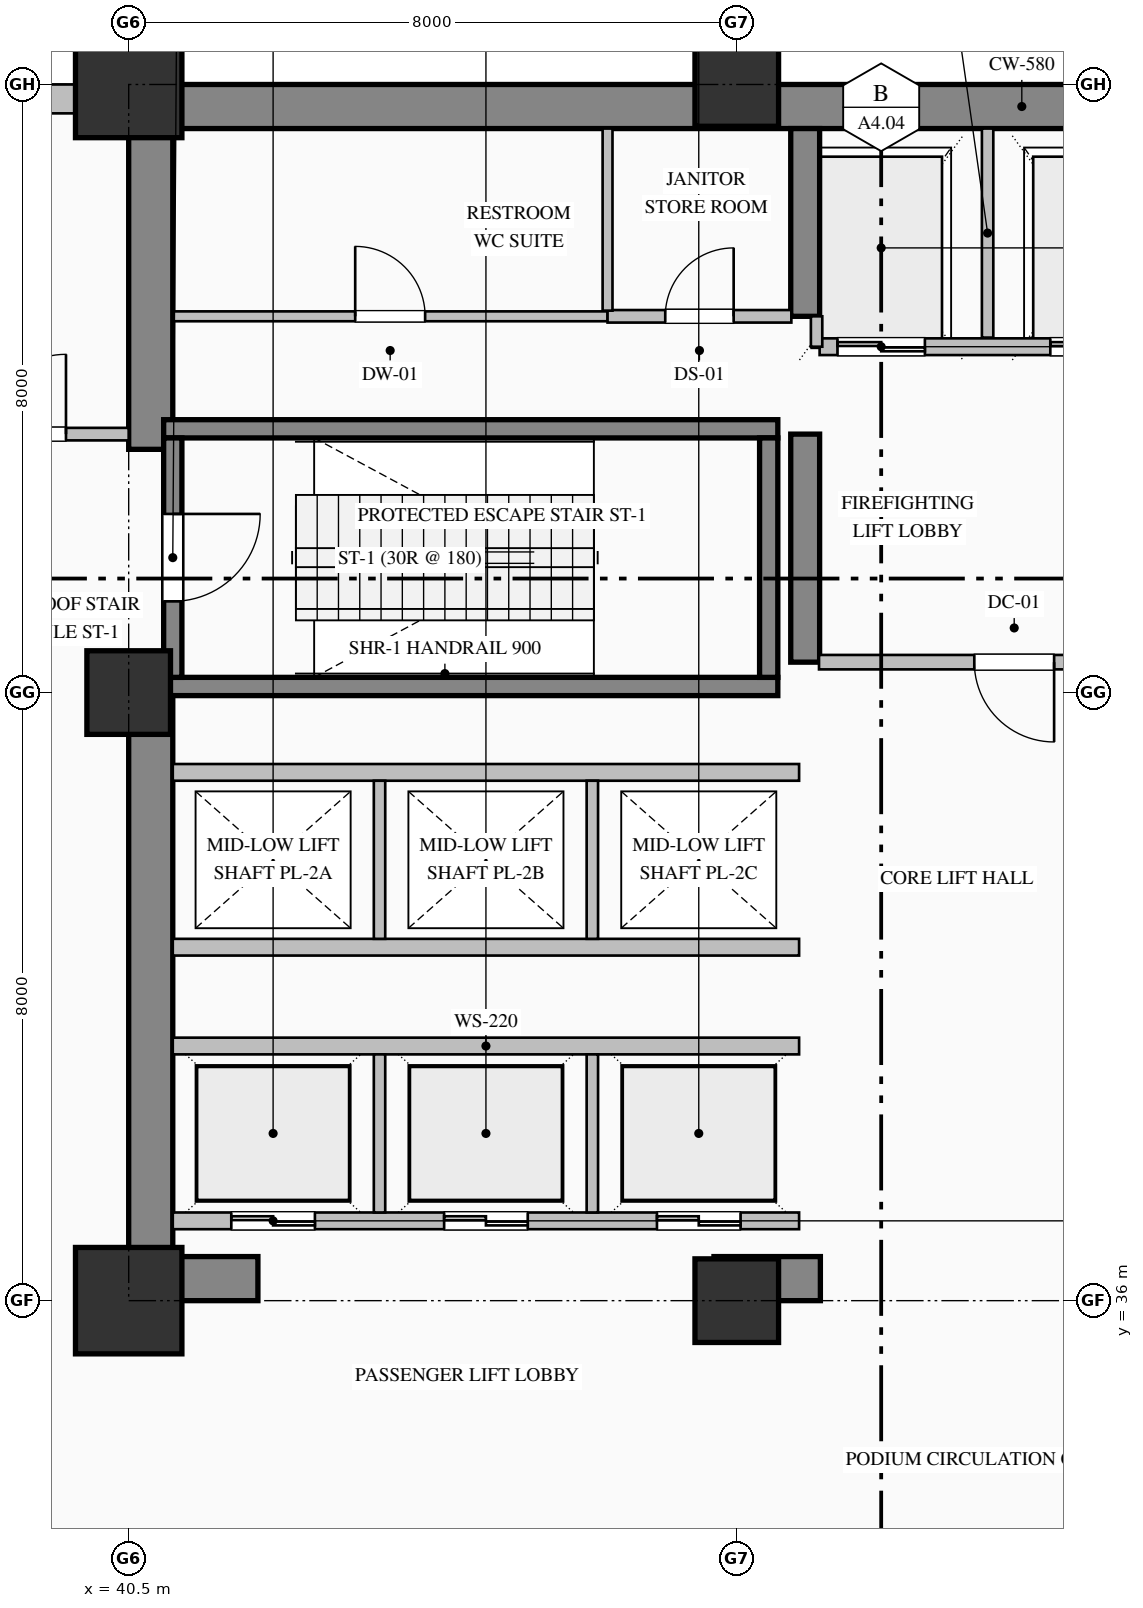
"""IFC4 building model, lengths in metres.
Left out: names, types, materials, properties, quantities, classifications, styles, units other than length and angle.
Written with IfcOpenShell. Run it as: python <this file> out.ifc"""

import sys

from ifc_helpers import new_model, si_unit, direction, frame, frame_2d, origin, origin_2d, place, context, subcontext, project, spatial, rectangle, hollow_rectangle, extrude, element, fill, save


model = new_model("IFC4")
c1 = context("Model", 3, precision=1e-05, world=origin(), true_north=direction((0.0, 1.0)))
c2 = subcontext(c1, "Body", "Model", "MODEL_VIEW")
j1 = project(units=[si_unit("LENGTHUNIT", "METRE"), si_unit("PLANEANGLEUNIT", "RADIAN")], contexts=[c1])
p1 = place(None, origin())
s1 = spatial("IfcSite", under=j1, at=p1, CompositionType="ELEMENT")
p2 = place(p1, origin())
s2 = spatial("IfcBuilding", under=s1, at=p2, CompositionType="ELEMENT")
p3 = place(p2, frame((0.0, 0.0, 6.0)))
s3 = spatial("IfcBuildingStorey", under=s2, at=p3, CompositionType="ELEMENT", Elevation=6.0)
p4 = place(p3, frame((40.5, 51.71, 0.0), z_axis=(0.0, 0.0, 1.0), x_axis=(1.0, 0.0, 0.0)))
e1 = element("IfcWall", 1, at=p4, inside=s3, PredefinedType="SHEAR", context=c2, shape_type="SweptSolid", body=[
    extrude(rectangle(XDim=23.5, YDim=0.58, at=frame_2d((11.75, 0.0))), origin(), (0.0, 0.0, 1.0), 5.12),
])
p5 = place(p3, frame((40.79, 36.58, 0.0), z_axis=(0.0, 0.0, 1.0), x_axis=(0.0, 1.0, 0.0)))
e2 = element("IfcWall", 2, at=p5, inside=s3, PredefinedType="SHEAR", context=c2, shape_type="SweptSolid", body=[
    extrude(rectangle(XDim=7.82, YDim=0.58, at=frame_2d((3.91, 0.0))), origin(), (0.0, 0.0, 1.0), 5.12),
])
p6 = place(p3, frame((40.79, 47.2, 0.0), z_axis=(0.0, 0.0, 1.0), x_axis=(0.0, 1.0, 0.0)))
e3 = element("IfcWall", 3, at=p6, inside=s3, PredefinedType="SHEAR", context=c2, shape_type="SweptSolid", body=[
    extrude(rectangle(XDim=4.22, YDim=0.58, at=frame_2d((2.11, 0.0))), origin(), (0.0, 0.0, 1.0), 5.12),
])
p7 = place(p3, frame((40.5, 36.29, 0.0), z_axis=(0.0, 0.0, 1.0), x_axis=(1.0, 0.0, 0.0)))
e4 = element("IfcWall", 4, at=p7, inside=s3, PredefinedType="SHEAR", context=c2, shape_type="SweptSolid", body=[
    extrude(rectangle(XDim=1.7, YDim=0.58, at=frame_2d((0.85, 0.0))), origin(), (0.0, 0.0, 1.0), 5.12),
])
p8 = place(p3, frame((48.2, 36.29, 0.0), z_axis=(0.0, 0.0, 1.0), x_axis=(1.0, 0.0, 0.0)))
e5 = element("IfcWall", 5, at=p8, inside=s3, PredefinedType="SHEAR", context=c2, shape_type="SweptSolid", body=[
    extrude(rectangle(XDim=1.4, YDim=0.58, at=frame_2d((0.7, 0.0))), origin(), (0.0, 0.0, 1.0), 5.12),
])
p9 = place(p3, frame((49.4, 44.4, 0.0), z_axis=(0.0, 0.0, 1.0), x_axis=(0.0, 1.0, 0.0)))
e6 = element("IfcWall", 6, at=p9, inside=s3, PredefinedType="SHEAR", context=c2, shape_type="SweptSolid", body=[
    extrude(rectangle(XDim=3.0, YDim=0.38, at=frame_2d((1.5, 0.0))), origin(), (0.0, 0.0, 1.0), 5.12),
])
p10 = place(p3, frame((49.4, 48.95, 0.0), z_axis=(0.0, 0.0, 1.0), x_axis=(0.0, 1.0, 0.0)))
e7 = element("IfcWall", 7, at=p10, inside=s3, PredefinedType="SHEAR", context=c2, shape_type="SweptSolid", body=[
    extrude(rectangle(XDim=2.47, YDim=0.38, at=frame_2d((1.235, 0.0))), origin(), (0.0, 0.0, 1.0), 5.12),
])
p11 = place(p3, frame((40.5, 36.0, 0.0), z_axis=(0.0, 0.0, 1.0), x_axis=(1.0, 0.0, 0.0)))
e8 = element("IfcColumn", 8, at=p11, inside=s3, PredefinedType="COLUMN", context=c2, shape_type="SweptSolid", body=[
    extrude(hollow_rectangle(XDim=1.4, YDim=1.4, WallThickness=0.05, at=origin_2d()), origin(), (0.0, 0.0, 1.0), 5.4),
])
p12 = place(p3, frame((40.5, 44.0, 0.0), z_axis=(0.0, 0.0, 1.0), x_axis=(1.0, 0.0, 0.0)))
e9 = element("IfcColumn", 9, at=p12, inside=s3, PredefinedType="COLUMN", context=c2, shape_type="SweptSolid", body=[
    extrude(rectangle(XDim=1.1, YDim=1.1, at=origin_2d()), origin(), (0.0, 0.0, 1.0), 5.4),
])
p13 = place(p3, frame((40.5, 52.0, 0.0), z_axis=(0.0, 0.0, 1.0), x_axis=(1.0, 0.0, 0.0)))
e10 = element("IfcColumn", 10, at=p13, inside=s3, PredefinedType="COLUMN", context=c2, shape_type="SweptSolid", body=[
    extrude(hollow_rectangle(XDim=1.4, YDim=1.4, WallThickness=0.05, at=origin_2d()), origin(), (0.0, 0.0, 1.0), 5.4),
])
p14 = place(p3, frame((48.5, 36.0, 0.0), z_axis=(0.0, 0.0, 1.0), x_axis=(1.0, 0.0, 0.0)))
e11 = element("IfcColumn", 11, at=p14, inside=s3, PredefinedType="COLUMN", context=c2, shape_type="SweptSolid", body=[
    extrude(rectangle(XDim=1.1, YDim=1.1, at=origin_2d()), origin(), (0.0, 0.0, 1.0), 5.4),
])
p15 = place(p3, frame((48.5, 52.0, 0.0), z_axis=(0.0, 0.0, 1.0), x_axis=(1.0, 0.0, 0.0)))
e12 = element("IfcColumn", 12, at=p15, inside=s3, PredefinedType="COLUMN", context=c2, shape_type="SweptSolid", body=[
    extrude(hollow_rectangle(XDim=1.1, YDim=1.1, WallThickness=0.04, at=origin_2d()), origin(), (0.0, 0.0, 1.0), 5.4),
])
p16 = place(p3, frame((4.0, 51.81, 0.0), z_axis=(0.0, 0.0, 1.0), x_axis=(1.0, 0.0, 0.0)))
e13 = element("IfcWall", 13, at=p16, inside=s3, PredefinedType="SOLIDWALL", context=c2, shape_type="SweptSolid", body=[
    extrude(rectangle(XDim=36.52, YDim=0.38, at=frame_2d((18.26, 0.0))), origin(), (0.0, 0.0, 1.0), 4.62),
])
p17 = place(p16, frame((16.7, 0.0, 0.85)))
e14 = element("IfcOpeningElement", 14, at=p17, cuts=e13, PredefinedType="OPENING", context=c2, shape_type="SweptSolid", body=[
    extrude(rectangle(XDim=2.6, YDim=3.1, at=frame_2d((1.3, 1.55))), frame((0.0, 0.2, 0.0), z_axis=(0.0, -1.0, 0.0), x_axis=(1.0, 0.0, 0.0)), (0.0, 0.0, 1.0), 0.4),
])
p18 = place(p16, frame((24.1, 0.0, 0.9)))
e15 = element("IfcOpeningElement", 15, at=p18, cuts=e13, PredefinedType="OPENING", context=c2, shape_type="SweptSolid", body=[
    extrude(rectangle(XDim=2.2, YDim=2.65, at=frame_2d((1.1, 1.325))), frame((0.0, 0.2, 0.0), z_axis=(0.0, -1.0, 0.0), x_axis=(1.0, 0.0, 0.0)), (0.0, 0.0, 1.0), 0.4),
])
for number, where, z_axis, x_axis in (
    (16, (40.96, 47.47, 0.0), (0.0, 0.0, 1.0), (1.0, 0.0, 0.0)),
    (17, (49.04, 44.08, 0.0), (0.0, 0.0, 1.0), (-1.0, 0.0, 0.0)),
):
    element("IfcWall", number, at=place(p3, frame(where, z_axis=z_axis, x_axis=x_axis)), inside=s3, PredefinedType="SOLIDWALL", context=c2, shape_type="SweptSolid", body=[
        extrude(rectangle(XDim=8.08, YDim=0.24, at=frame_2d((4.04, 0.0))), origin(), (0.0, 0.0, 1.0), 5.4),
    ])
p19 = place(p3, frame((41.08, 47.35, 0.0), z_axis=(0.0, 0.0, 1.0), x_axis=(0.0, -1.0, 0.0)))
e18 = element("IfcWall", 18, at=p19, inside=s3, PredefinedType="SOLIDWALL", context=c2, shape_type="SweptSolid", body=[
    extrude(rectangle(XDim=3.15, YDim=0.24, at=frame_2d((1.575, 0.0))), origin(), (0.0, 0.0, 1.0), 5.4),
])
p20 = place(p19, frame((1.0, 0.0, 0.0)))
e19 = element("IfcOpeningElement", 19, at=p20, cuts=e18, PredefinedType="OPENING", context=c2, shape_type="SweptSolid", body=[
    extrude(rectangle(XDim=1.15, YDim=2.2, at=frame_2d((0.575, 1.1))), frame((0.0, 0.13, 0.0), z_axis=(0.0, -1.0, 0.0), x_axis=(1.0, 0.0, 0.0)), (0.0, 0.0, 1.0), 0.26),
])
p21 = place(p3, frame((48.92, 44.2, 0.0), z_axis=(0.0, 0.0, 1.0), x_axis=(0.0, 1.0, 0.0)))
e20 = element("IfcWall", 20, at=p21, inside=s3, PredefinedType="SOLIDWALL", context=c2, shape_type="SweptSolid", body=[
    extrude(rectangle(XDim=3.15, YDim=0.24, at=frame_2d((1.575, 0.0))), origin(), (0.0, 0.0, 1.0), 5.4),
])
p22 = place(p3, frame((54.71, 48.55, 0.0), z_axis=(0.0, 0.0, 1.0), x_axis=(-1.0, 0.0, 0.0)))
e21 = element("IfcWall", 21, at=p22, inside=s3, PredefinedType="PARTITIONING", context=c2, shape_type="SweptSolid", body=[
    extrude(rectangle(XDim=5.12, YDim=0.22, at=frame_2d((2.56, 0.0))), origin(), (0.0, 0.0, 1.0), 5.12),
])
p23 = place(p22, frame((3.735, 0.0, 0.0)))
e22 = element("IfcOpeningElement", 22, at=p23, cuts=e21, PredefinedType="OPENING", context=c2, shape_type="SweptSolid", body=[
    extrude(rectangle(XDim=1.15, YDim=2.2, at=frame_2d((0.575, 1.1))), frame((0.0, 0.12, 0.0), z_axis=(0.0, -1.0, 0.0), x_axis=(1.0, 0.0, 0.0)), (0.0, 0.0, 1.0), 0.24),
])
p24 = place(p22, frame((0.935, 0.0, 0.0)))
e23 = element("IfcOpeningElement", 23, at=p24, cuts=e21, PredefinedType="OPENING", context=c2, shape_type="SweptSolid", body=[
    extrude(rectangle(XDim=1.15, YDim=2.2, at=frame_2d((0.575, 1.1))), frame((0.0, 0.12, 0.0), z_axis=(0.0, -1.0, 0.0), x_axis=(1.0, 0.0, 0.0)), (0.0, 0.0, 1.0), 0.24),
])
p25 = place(p3, frame((51.8, 48.67, 0.0), z_axis=(0.0, 0.0, 1.0), x_axis=(0.0, 1.0, 0.0)))
e24 = element("IfcWall", 24, at=p25, inside=s3, PredefinedType="PARTITIONING", context=c2, shape_type="SweptSolid", body=[
    extrude(rectangle(XDim=2.75, YDim=0.15, at=frame_2d((1.375, 0.0))), origin(), (0.0, 0.0, 1.0), 5.12),
])
p26 = place(p3, frame((49.55, 48.55, 0.0), z_axis=(0.0, 0.0, 1.0), x_axis=(0.0, 1.0, 0.0)))
e25 = element("IfcWall", 25, at=p26, inside=s3, PredefinedType="PARTITIONING", context=c2, shape_type="SweptSolid", body=[
    extrude(rectangle(XDim=0.4, YDim=0.15, at=frame_2d((0.2, 0.0))), origin(), (0.0, 0.0, 1.0), 5.12),
])
p27 = place(p3, frame((49.32, 37.05, 0.0), z_axis=(0.0, 0.0, 1.0), x_axis=(-1.0, 0.0, 0.0)))
e26 = element("IfcWall", 26, at=p27, inside=s3, PredefinedType="PARTITIONING", context=c2, shape_type="SweptSolid", body=[
    extrude(rectangle(XDim=8.24, YDim=0.22, at=frame_2d((4.12, 0.0))), origin(), (0.0, 0.0, 1.0), 5.12),
])
p28 = place(p27, frame((6.37, 0.0, 0.0)))
e27 = element("IfcOpeningElement", 27, at=p28, cuts=e26, PredefinedType="OPENING", context=c2, shape_type="SweptSolid", body=[
    extrude(rectangle(XDim=1.1, YDim=2.2, at=frame_2d((0.55, 1.1))), frame((0.0, 0.12, 0.0), z_axis=(0.0, -1.0, 0.0), x_axis=(1.0, 0.0, 0.0)), (0.0, 0.0, 1.0), 0.24),
])
p29 = place(p27, frame((3.57, 0.0, 0.0)))
e28 = element("IfcOpeningElement", 28, at=p29, cuts=e26, PredefinedType="OPENING", context=c2, shape_type="SweptSolid", body=[
    extrude(rectangle(XDim=1.1, YDim=2.2, at=frame_2d((0.55, 1.1))), frame((0.0, 0.12, 0.0), z_axis=(0.0, -1.0, 0.0), x_axis=(1.0, 0.0, 0.0)), (0.0, 0.0, 1.0), 0.24),
])
p30 = place(p27, frame((0.77, 0.0, 0.0)))
e29 = element("IfcOpeningElement", 29, at=p30, cuts=e26, PredefinedType="OPENING", context=c2, shape_type="SweptSolid", body=[
    extrude(rectangle(XDim=1.1, YDim=2.2, at=frame_2d((0.55, 1.1))), frame((0.0, 0.12, 0.0), z_axis=(0.0, -1.0, 0.0), x_axis=(1.0, 0.0, 0.0)), (0.0, 0.0, 1.0), 0.24),
])
p31 = place(p3, frame((41.08, 39.35, 0.0), z_axis=(0.0, 0.0, 1.0), x_axis=(1.0, 0.0, 0.0)))
e30 = element("IfcWall", 30, at=p31, inside=s3, PredefinedType="PARTITIONING", context=c2, shape_type="SweptSolid", body=[
    extrude(rectangle(XDim=8.24, YDim=0.22, at=frame_2d((4.12, 0.0))), origin(), (0.0, 0.0, 1.0), 5.12),
])
for number, where, z_axis, x_axis in (
    (31, (43.8, 37.16, 0.0), (0.0, 0.0, 1.0), (0.0, 1.0, 0.0)),
    (32, (46.6, 37.16, 0.0), (0.0, 0.0, 1.0), (0.0, 1.0, 0.0)),
):
    element("IfcWall", number, at=place(p3, frame(where, z_axis=z_axis, x_axis=x_axis)), inside=s3, PredefinedType="PARTITIONING", context=c2, shape_type="SweptSolid", body=[
        extrude(rectangle(XDim=2.08, YDim=0.15, at=frame_2d((1.04, 0.0))), origin(), (0.0, 0.0, 1.0), 5.12),
    ])
for number, where, z_axis, x_axis in (
    (33, (49.32, 40.65, 0.0), (0.0, 0.0, 1.0), (-1.0, 0.0, 0.0)),
    (34, (41.08, 42.95, 0.0), (0.0, 0.0, 1.0), (1.0, 0.0, 0.0)),
):
    element("IfcWall", number, at=place(p3, frame(where, z_axis=z_axis, x_axis=x_axis)), inside=s3, PredefinedType="PARTITIONING", context=c2, shape_type="SweptSolid", body=[
        extrude(rectangle(XDim=8.24, YDim=0.22, at=frame_2d((4.12, 0.0))), origin(), (0.0, 0.0, 1.0), 5.12),
    ])
for number, where, z_axis, x_axis in (
    (35, (43.8, 40.76, 0.0), (0.0, 0.0, 1.0), (0.0, 1.0, 0.0)),
    (36, (46.6, 40.76, 0.0), (0.0, 0.0, 1.0), (0.0, 1.0, 0.0)),
):
    element("IfcWall", number, at=place(p3, frame(where, z_axis=z_axis, x_axis=x_axis)), inside=s3, PredefinedType="PARTITIONING", context=c2, shape_type="SweptSolid", body=[
        extrude(rectangle(XDim=2.08, YDim=0.15, at=frame_2d((1.04, 0.0))), origin(), (0.0, 0.0, 1.0), 5.12),
    ])
p32 = place(p3, frame((37.8, 47.4, 0.0), z_axis=(0.0, 0.0, 1.0), x_axis=(1.0, 0.0, 0.0)))
e37 = element("IfcWall", 37, at=p32, inside=s3, PredefinedType="PARTITIONING", context=c2, shape_type="SweptSolid", body=[
    extrude(rectangle(XDim=2.7, YDim=0.165, at=frame_2d((1.35, 0.0))), origin(), (0.0, 0.0, 1.0), 5.12),
])
p33 = place(p32, frame((0.825, 0.0, 0.0)))
e38 = element("IfcOpeningElement", 38, at=p33, cuts=e37, PredefinedType="OPENING", context=c2, shape_type="SweptSolid", body=[
    extrude(rectangle(XDim=1.05, YDim=2.15, at=frame_2d((0.525, 1.075))), frame((0.0, 0.093, 0.0), z_axis=(0.0, -1.0, 0.0), x_axis=(1.0, 0.0, 0.0)), (0.0, 0.0, 1.0), 0.185),
])
p34 = place(p3, frame((41.08, 48.95, 0.0), z_axis=(0.0, 0.0, 1.0), x_axis=(1.0, 0.0, 0.0)))
e39 = element("IfcWall", 39, at=p34, inside=s3, PredefinedType="PARTITIONING", context=c2, shape_type="SweptSolid", body=[
    extrude(rectangle(XDim=5.72, YDim=0.13, at=frame_2d((2.86, 0.0))), origin(), (0.0, 0.0, 1.0), 5.12),
])
p35 = place(p34, frame((2.4, 0.0, 0.0)))
e40 = element("IfcOpeningElement", 40, at=p35, cuts=e39, PredefinedType="OPENING", context=c2, shape_type="SweptSolid", body=[
    extrude(rectangle(XDim=0.92, YDim=2.15, at=frame_2d((0.46, 1.075))), frame((0.0, 0.075, 0.0), z_axis=(0.0, -1.0, 0.0), x_axis=(1.0, 0.0, 0.0)), (0.0, 0.0, 1.0), 0.15),
])
p36 = place(p3, frame((46.8, 48.95, 0.0), z_axis=(0.0, 0.0, 1.0), x_axis=(1.0, 0.0, 0.0)))
e41 = element("IfcWall", 41, at=p36, inside=s3, PredefinedType="PARTITIONING", context=c2, shape_type="SweptSolid", body=[
    extrude(rectangle(XDim=2.418, YDim=0.165, at=frame_2d((1.209, 0.0))), origin(), (0.0, 0.0, 1.0), 5.12),
])
p37 = place(p36, frame((0.759, 0.0, 0.0)))
e42 = element("IfcOpeningElement", 42, at=p37, cuts=e41, PredefinedType="OPENING", context=c2, shape_type="SweptSolid", body=[
    extrude(rectangle(XDim=0.9, YDim=2.15, at=frame_2d((0.45, 1.075))), frame((0.0, 0.093, 0.0), z_axis=(0.0, -1.0, 0.0), x_axis=(1.0, 0.0, 0.0)), (0.0, 0.0, 1.0), 0.185),
])
p38 = place(p3, frame((54.718, 44.4, 0.0), z_axis=(0.0, 0.0, 1.0), x_axis=(-1.0, 0.0, 0.0)))
e43 = element("IfcWall", 43, at=p38, inside=s3, PredefinedType="PARTITIONING", context=c2, shape_type="SweptSolid", body=[
    extrude(rectangle(XDim=5.136, YDim=0.19, at=frame_2d((2.568, 0.0))), origin(), (0.0, 0.0, 1.0), 5.12),
])
p39 = place(p38, frame((2.043, 0.0, 0.0)))
e44 = element("IfcOpeningElement", 44, at=p39, cuts=e43, PredefinedType="OPENING", context=c2, shape_type="SweptSolid", body=[
    extrude(rectangle(XDim=1.05, YDim=2.15, at=frame_2d((0.525, 1.075))), frame((0.0, 0.105, 0.0), z_axis=(0.0, -1.0, 0.0), x_axis=(1.0, 0.0, 0.0)), (0.0, 0.0, 1.0), 0.21),
])
p40 = place(p3, frame((46.8, 51.42, 0.0), z_axis=(0.0, 0.0, 1.0), x_axis=(0.0, -1.0, 0.0)))
e45 = element("IfcWall", 45, at=p40, inside=s3, PredefinedType="PARTITIONING", context=c2, shape_type="SweptSolid", body=[
    extrude(rectangle(XDim=2.396, YDim=0.13, at=frame_2d((1.198, 0.0))), origin(), (0.0, 0.0, 1.0), 5.12),
])
p41 = place(p20, origin())
e46 = element("IfcDoor", 46, at=p41, inside=s3, OperationType="SINGLE_SWING_LEFT", PredefinedType="DOOR", context=c2, shape_type="SweptSolid", body=[
    extrude(rectangle(XDim=1.15, YDim=2.2, at=frame_2d((0.575, 1.1))), frame((0.0, 0.025, 0.0), z_axis=(0.0, -1.0, 0.0), x_axis=(1.0, 0.0, 0.0)), (0.0, 0.0, 1.0), 0.05),
])
fill(e19, e46)
p42 = place(p23, origin())
e47 = element("IfcDoor", 47, at=p42, inside=s3, OperationType="DOUBLE_DOOR_SLIDING", PredefinedType="DOOR", context=c2, shape_type="SweptSolid", body=[
    extrude(rectangle(XDim=1.15, YDim=2.2, at=frame_2d((0.575, 1.1))), frame((0.0, 0.025, 0.0), z_axis=(0.0, -1.0, 0.0), x_axis=(1.0, 0.0, 0.0)), (0.0, 0.0, 1.0), 0.05),
])
fill(e22, e47)
p43 = place(p24, origin())
e48 = element("IfcDoor", 48, at=p43, inside=s3, OperationType="DOUBLE_DOOR_SLIDING", PredefinedType="DOOR", context=c2, shape_type="SweptSolid", body=[
    extrude(rectangle(XDim=1.15, YDim=2.2, at=frame_2d((0.575, 1.1))), frame((0.0, 0.025, 0.0), z_axis=(0.0, -1.0, 0.0), x_axis=(1.0, 0.0, 0.0)), (0.0, 0.0, 1.0), 0.05),
])
fill(e23, e48)
p44 = place(p28, origin())
e49 = element("IfcDoor", 49, at=p44, inside=s3, OperationType="DOUBLE_DOOR_SLIDING", PredefinedType="DOOR", context=c2, shape_type="SweptSolid", body=[
    extrude(rectangle(XDim=1.1, YDim=2.2, at=frame_2d((0.55, 1.1))), frame((0.0, 0.025, 0.0), z_axis=(0.0, -1.0, 0.0), x_axis=(1.0, 0.0, 0.0)), (0.0, 0.0, 1.0), 0.05),
])
fill(e27, e49)
p45 = place(p29, origin())
e50 = element("IfcDoor", 50, at=p45, inside=s3, OperationType="DOUBLE_DOOR_SLIDING", PredefinedType="DOOR", context=c2, shape_type="SweptSolid", body=[
    extrude(rectangle(XDim=1.1, YDim=2.2, at=frame_2d((0.55, 1.1))), frame((0.0, 0.025, 0.0), z_axis=(0.0, -1.0, 0.0), x_axis=(1.0, 0.0, 0.0)), (0.0, 0.0, 1.0), 0.05),
])
fill(e28, e50)
p46 = place(p30, origin())
e51 = element("IfcDoor", 51, at=p46, inside=s3, OperationType="DOUBLE_DOOR_SLIDING", PredefinedType="DOOR", context=c2, shape_type="SweptSolid", body=[
    extrude(rectangle(XDim=1.1, YDim=2.2, at=frame_2d((0.55, 1.1))), frame((0.0, 0.025, 0.0), z_axis=(0.0, -1.0, 0.0), x_axis=(1.0, 0.0, 0.0)), (0.0, 0.0, 1.0), 0.05),
])
fill(e29, e51)
p47 = place(p39, origin())
e52 = element("IfcDoor", 52, at=p47, inside=s3, OperationType="SINGLE_SWING_LEFT", PredefinedType="DOOR", context=c2, shape_type="SweptSolid", body=[
    extrude(rectangle(XDim=1.05, YDim=2.15, at=frame_2d((0.525, 1.075))), frame((0.0, 0.025, 0.0), z_axis=(0.0, -1.0, 0.0), x_axis=(1.0, 0.0, 0.0)), (0.0, 0.0, 1.0), 0.05),
])
fill(e44, e52)
p48 = place(p33, origin())
e53 = element("IfcDoor", 53, at=p48, inside=s3, OperationType="SINGLE_SWING_RIGHT", PredefinedType="DOOR", context=c2, shape_type="SweptSolid", body=[
    extrude(rectangle(XDim=1.05, YDim=2.15, at=frame_2d((0.525, 1.075))), frame((0.0, 0.025, 0.0), z_axis=(0.0, -1.0, 0.0), x_axis=(1.0, 0.0, 0.0)), (0.0, 0.0, 1.0), 0.05),
])
fill(e38, e53)
p49 = place(p35, origin())
e54 = element("IfcDoor", 54, at=p49, inside=s3, OperationType="SINGLE_SWING_LEFT", PredefinedType="DOOR", context=c2, shape_type="SweptSolid", body=[
    extrude(rectangle(XDim=0.92, YDim=2.15, at=frame_2d((0.46, 1.075))), frame((0.0, 0.025, 0.0), z_axis=(0.0, -1.0, 0.0), x_axis=(1.0, 0.0, 0.0)), (0.0, 0.0, 1.0), 0.05),
])
fill(e40, e54)
p50 = place(p37, origin())
e55 = element("IfcDoor", 55, at=p50, inside=s3, OperationType="SINGLE_SWING_RIGHT", PredefinedType="DOOR", context=c2, shape_type="SweptSolid", body=[
    extrude(rectangle(XDim=0.9, YDim=2.15, at=frame_2d((0.45, 1.075))), frame((0.0, 0.025, 0.0), z_axis=(0.0, -1.0, 0.0), x_axis=(1.0, 0.0, 0.0)), (0.0, 0.0, 1.0), 0.05),
])
fill(e42, e55)
save(model, sys.argv[1])
